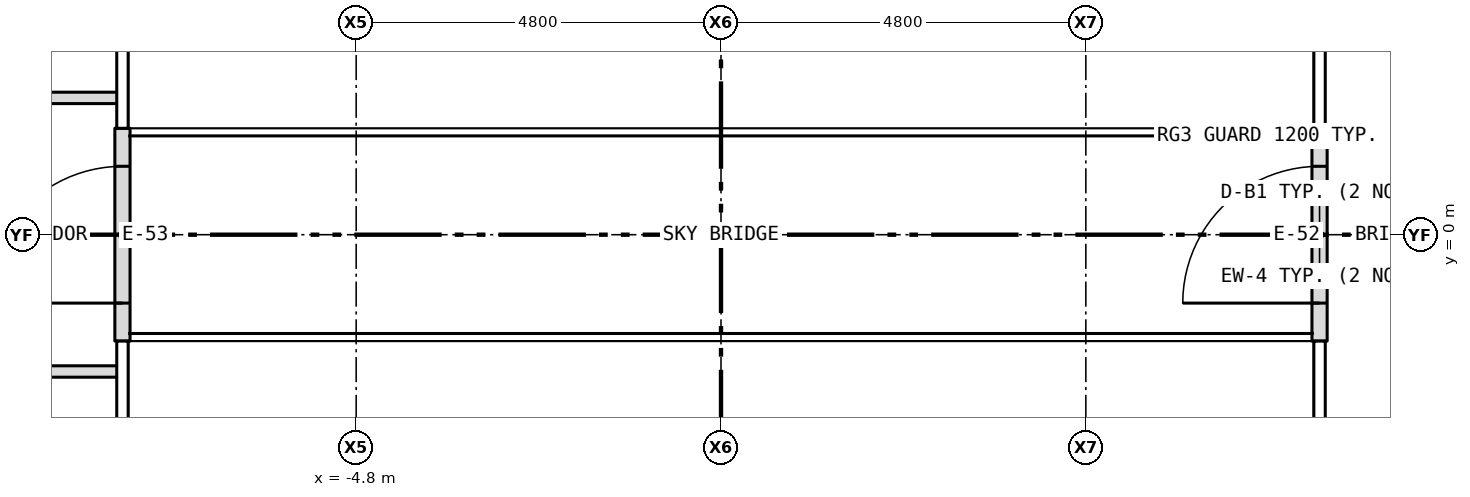
"""IFC4 building model, lengths in metres.
Left out: names, types, materials, properties, quantities, classifications, styles, units other than length and angle.
Written with IfcOpenShell. Run it as: python <this file> out.ifc"""

import sys

from ifc_helpers import new_model, si_unit, direction, frame, frame_2d, origin, place, context, subcontext, project, spatial, rectangle, extrude, element, fill, save


model = new_model("IFC4")
c1 = context("Model", 3, precision=1e-05, world=origin(), true_north=direction((0.0, 1.0)))
c2 = subcontext(c1, "Body", "Model", "MODEL_VIEW")
j1 = project(units=[si_unit("LENGTHUNIT", "METRE"), si_unit("PLANEANGLEUNIT", "RADIAN")], contexts=[c1])
p1 = place(None, origin())
s1 = spatial("IfcSite", under=j1, at=p1, CompositionType="ELEMENT")
p2 = place(p1, origin())
s2 = spatial("IfcBuilding", under=s1, at=p2, CompositionType="ELEMENT")
p3 = place(p2, frame((0.0, 0.0, 131.0)))
s3 = spatial("IfcBuildingStorey", under=s2, at=p3, CompositionType="ELEMENT", Elevation=131.0)
p4 = place(p3, frame((7.875, -1.4, 0.0), z_axis=(0.0, 0.0, 1.0), x_axis=(0.0, 1.0, 0.0)))
e1 = element("IfcWall", 1, at=p4, inside=s3, PredefinedType="SOLIDWALL", context=c2, shape_type="SweptSolid", body=[
    extrude(rectangle(XDim=2.8, YDim=0.2, at=frame_2d((1.4, 0.0))), origin(), (0.0, 0.0, 1.0), 3.5),
])
p5 = place(p4, frame((0.5, 0.0, 0.0)))
e2 = element("IfcOpeningElement", 2, at=p5, cuts=e1, PredefinedType="OPENING", context=c2, shape_type="SweptSolid", body=[
    extrude(rectangle(XDim=1.8, YDim=2.1, at=frame_2d((0.9, 1.05))), frame((0.0, 0.112, 0.0), z_axis=(0.0, -1.0, 0.0), x_axis=(1.0, 0.0, 0.0)), (0.0, 0.0, 1.0), 0.224),
])
p6 = place(p3, frame((-7.875, -1.4, 0.0), z_axis=(0.0, 0.0, 1.0), x_axis=(0.0, 1.0, 0.0)))
e3 = element("IfcWall", 3, at=p6, inside=s3, PredefinedType="SOLIDWALL", context=c2, shape_type="SweptSolid", body=[
    extrude(rectangle(XDim=2.8, YDim=0.2, at=frame_2d((1.4, 0.0))), origin(), (0.0, 0.0, 1.0), 3.5),
])
p7 = place(p6, frame((0.5, 0.0, 0.0)))
e4 = element("IfcOpeningElement", 4, at=p7, cuts=e3, PredefinedType="OPENING", context=c2, shape_type="SweptSolid", body=[
    extrude(rectangle(XDim=1.8, YDim=2.1, at=frame_2d((0.9, 1.05))), frame((0.0, 0.112, 0.0), z_axis=(0.0, -1.0, 0.0), x_axis=(1.0, 0.0, 0.0)), (0.0, 0.0, 1.0), 0.224),
])
for number, where, z_axis, x_axis in (
    (5, (-12.4, -1.8, 0.0), (0.0, 0.0, 1.0), (1.0, 0.0, 0.0)),
    (6, (-12.4, 1.8, 0.0), (0.0, 0.0, 1.0), (1.0, 0.0, 0.0)),
):
    element("IfcWall", number, at=place(p3, frame(where, z_axis=z_axis, x_axis=x_axis)), inside=s3, PredefinedType="PARTITIONING", context=c2, shape_type="SweptSolid", body=[
        extrude(rectangle(XDim=4.48, YDim=0.15, at=frame_2d((2.24, 0.0))), origin(), (0.0, 0.0, 1.0), 3.35),
    ])
p8 = place(p5, origin())
e7 = element("IfcDoor", 7, at=p8, inside=s3, OperationType="DOUBLE_DOOR_DOUBLE_SWING", PredefinedType="DOOR", context=c2, shape_type="SweptSolid", body=[
    extrude(rectangle(XDim=1.8, YDim=2.1, at=frame_2d((0.9, 1.05))), frame((0.0, 0.025, 0.0), z_axis=(0.0, -1.0, 0.0), x_axis=(1.0, 0.0, 0.0)), (0.0, 0.0, 1.0), 0.05),
])
fill(e2, e7)
p9 = place(p7, origin())
e8 = element("IfcDoor", 8, at=p9, inside=s3, OperationType="DOUBLE_DOOR_DOUBLE_SWING", PredefinedType="DOOR", context=c2, shape_type="SweptSolid", body=[
    extrude(rectangle(XDim=1.8, YDim=2.1, at=frame_2d((0.9, 1.05))), frame((0.0, 0.025, 0.0), z_axis=(0.0, -1.0, 0.0), x_axis=(1.0, 0.0, 0.0)), (0.0, 0.0, 1.0), 0.05),
])
fill(e4, e8)
save(model, sys.argv[1])
